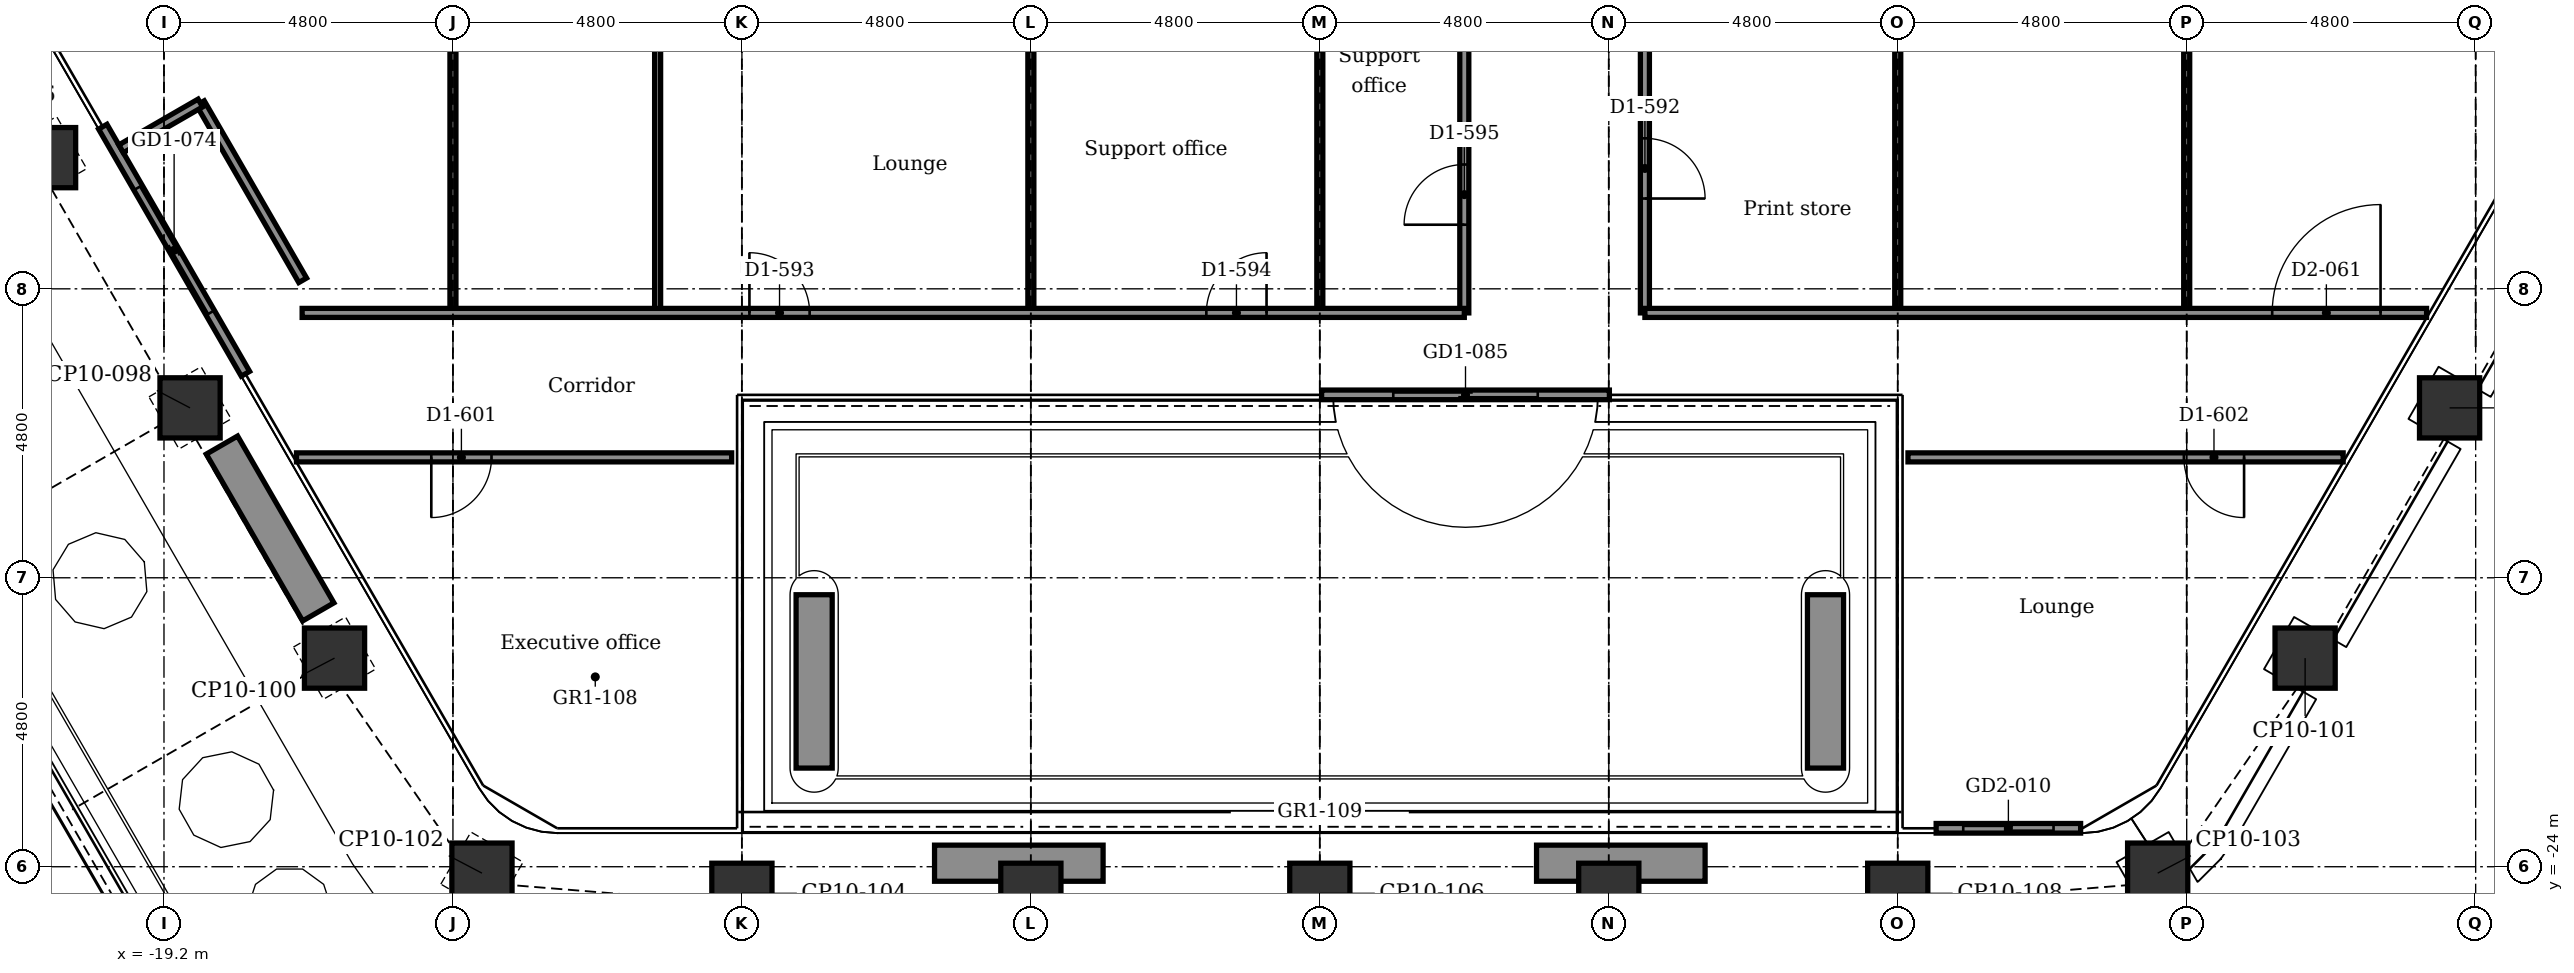
"""IFC4 building model, lengths in metres.
Left out: names, types, materials, properties, quantities, classifications, styles, units other than length and angle.
Written with IfcOpenShell. Run it as: python <this file> out.ifc"""

import sys

from ifc_helpers import new_model, si_unit, direction, frame, frame_2d, origin, origin_2d, place, context, subcontext, project, spatial, rectangle, extrude, element, fill, save


model = new_model("IFC4")
c1 = context("Model", 3, precision=1e-05, world=origin(), true_north=direction((0.0, 1.0)))
c2 = subcontext(c1, "Body", "Model", "MODEL_VIEW")
j1 = project(units=[si_unit("LENGTHUNIT", "METRE"), si_unit("PLANEANGLEUNIT", "RADIAN")], contexts=[c1])
p1 = place(None, origin())
s1 = spatial("IfcSite", under=j1, at=p1, CompositionType="ELEMENT")
p2 = place(p1, origin())
s2 = spatial("IfcBuilding", under=s1, at=p2, CompositionType="ELEMENT")
p3 = place(p2, frame((0.0, 0.0, 212.9)))
s3 = spatial("IfcBuildingStorey", under=s2, at=p3, CompositionType="ELEMENT", Elevation=212.9)
for number, where, z_axis, x_axis in (
    (1, (18.767, -16.378, -0.15), (0.0, 0.0, 1.0), (0.5, 0.866, 0.0)),
    (2, (16.367, -20.535, -0.15), (0.0, 0.0, 1.0), (0.5, 0.866, 0.0)),
    (3, (13.918, -24.107, -0.15), (0.0, 0.0, 1.0), (0.866, 0.5, 0.0)),
    (4, (9.6, -24.442, -0.15), (0.0, 0.0, 1.0), (1.0, 0.0, 0.0)),
    (5, (4.8, -24.442, -0.15), (0.0, 0.0, 1.0), (1.0, 0.0, 0.0)),
    (6, (0.0, -24.442, -0.15), (0.0, 0.0, 1.0), (1.0, 0.0, 0.0)),
    (7, (-4.8, -24.442, -0.15), (0.0, 0.0, 1.0), (1.0, 0.0, 0.0)),
    (8, (-9.6, -24.442, -0.15), (0.0, 0.0, 1.0), (1.0, 0.0, 0.0)),
    (9, (-13.918, -24.107, -0.15), (0.0, 0.0, 1.0), (0.5, 0.866, 0.0)),
    (10, (-16.367, -20.535, -0.15), (0.0, 0.0, 1.0), (0.866, 0.5, 0.0)),
    (11, (-18.767, -16.378, -0.15), (0.0, 0.0, 1.0), (0.866, 0.5, 0.0)),
    (12, (-21.167, -12.221, -0.15), (0.0, 0.0, 1.0), (0.866, 0.5, 0.0)),
):
    element("IfcColumn", number, at=place(p3, frame(where, z_axis=z_axis, x_axis=x_axis)), inside=s3, PredefinedType="COLUMN", context=c2, shape_type="SweptSolid", body=[
        extrude(rectangle(XDim=1.0, YDim=1.0, at=origin_2d()), origin(), (0.0, 0.0, 1.0), 3.75),
    ])
p4 = place(p3, frame((12.638, -23.362, 0.0), z_axis=(0.0, 0.0, 1.0), x_axis=(-1.0, 0.0, 0.0)))
e13 = element("IfcWall", 13, at=p4, inside=s3, PredefinedType="PARTITIONING", context=c2, shape_type="SweptSolid", body=[
    extrude(rectangle(XDim=2.4, YDim=0.16, at=frame_2d((1.2, 0.0))), origin(), (0.0, 0.0, 1.0), 3.6),
])
p5 = place(p4, frame((0.45, 0.0, 0.0)))
e14 = element("IfcOpeningElement", 14, at=p5, cuts=e13, PredefinedType="OPENING", context=c2, shape_type="SweptSolid", body=[
    extrude(rectangle(XDim=1.5, YDim=2.4, at=frame_2d((0.75, 1.2))), frame((0.0, 0.09, 0.0), z_axis=(0.0, -1.0, 0.0), x_axis=(1.0, 0.0, 0.0)), (0.0, 0.0, 1.0), 0.18),
])
p6 = place(p3, frame((4.81, -16.162, 0.0), z_axis=(0.0, 0.0, 1.0), x_axis=(-1.0, 0.0, 0.0)))
e15 = element("IfcWall", 15, at=p6, inside=s3, PredefinedType="PARTITIONING", context=c2, shape_type="SweptSolid", body=[
    extrude(rectangle(XDim=4.78, YDim=0.16, at=frame_2d((2.39, 0.0))), origin(), (0.0, 0.0, 1.0), 3.6),
])
p7 = place(p6, frame((1.19, 0.0, 0.0)))
e16 = element("IfcOpeningElement", 16, at=p7, cuts=e15, PredefinedType="OPENING", context=c2, shape_type="SweptSolid", body=[
    extrude(rectangle(XDim=2.4, YDim=2.4, at=frame_2d((1.2, 1.2))), frame((0.0, 0.09, 0.0), z_axis=(0.0, -1.0, 0.0), x_axis=(1.0, 0.0, 0.0)), (0.0, 0.0, 1.0), 0.18),
])
p8 = place(p3, frame((-17.847, -15.812, 0.0), z_axis=(0.0, 0.0, 1.0), x_axis=(-0.5000167099, 0.866015756104, 0.0)))
e17 = element("IfcWall", 17, at=p8, inside=s3, PredefinedType="PARTITIONING", context=c2, shape_type="SweptSolid", body=[
    extrude(rectangle(XDim=4.74, YDim=0.16, at=frame_2d((2.37, 0.0))), origin(), (0.0, 0.0, 1.0), 3.6),
])
p9 = place(p8, frame((1.17, 0.0, 0.0)))
e18 = element("IfcOpeningElement", 18, at=p9, cuts=e17, PredefinedType="OPENING", context=c2, shape_type="SweptSolid", body=[
    extrude(rectangle(XDim=2.4, YDim=2.4, at=frame_2d((1.2, 1.2))), frame((0.0, 0.09, 0.0), z_axis=(0.0, -1.0, 0.0), x_axis=(1.0, 0.0, 0.0)), (0.0, 0.0, 1.0), 0.18),
])
p10 = place(p3, frame((-16.637, -19.767, 0.0), z_axis=(0.0, 0.0, 1.0), x_axis=(-0.500028443584, 0.866008981251, 0.0)))
e19 = element("IfcWall", 19, at=p10, inside=s3, PredefinedType="USERDEFINED", context=c2, shape_type="SweptSolid", body=[
    extrude(rectangle(XDim=3.2, YDim=0.6, at=frame_2d((1.6, 0.0))), origin(), (0.0, 0.0, 1.0), 0.7),
])
for number, where, z_axis, x_axis in (
    (20, (8.4, -19.481, 0.0), (0.0, 0.0, 1.0), (0.0, -1.0, 0.0)),
    (21, (-8.4, -19.481, 0.0), (0.0, 0.0, 1.0), (0.0, -1.0, 0.0)),
):
    element("IfcWall", number, at=place(p3, frame(where, z_axis=z_axis, x_axis=x_axis)), inside=s3, PredefinedType="USERDEFINED", context=c2, shape_type="SweptSolid", body=[
        extrude(rectangle(XDim=2.88, YDim=0.6, at=frame_2d((1.44, 0.0))), origin(), (0.0, 0.0, 1.0), 0.7),
    ])
for number, where, z_axis, x_axis in (
    (22, (3.6, -23.942, 0.0), (0.0, 0.0, 1.0), (1.0, 0.0, 0.0)),
    (23, (-3.6, -23.942, 0.0), (0.0, 0.0, 1.0), (-1.0, 0.0, 0.0)),
):
    element("IfcWall", number, at=place(p3, frame(where, z_axis=z_axis, x_axis=x_axis)), inside=s3, PredefinedType="USERDEFINED", context=c2, shape_type="SweptSolid", body=[
        extrude(rectangle(XDim=2.8, YDim=0.6, at=frame_2d((1.4, 0.0))), origin(), (0.0, 0.0, 1.0), 0.7),
    ])
p11 = place(p3, frame((14.4, -14.8, 0.0), z_axis=(0.0, 0.0, 1.0), x_axis=(0.0, 1.0, 0.0)))
e24 = element("IfcWall", 24, at=p11, inside=s3, PredefinedType="PARTITIONING", context=c2, shape_type="SweptSolid", body=[
    extrude(rectangle(XDim=5.094, YDim=0.1, at=frame_2d((2.547, 0.0))), origin(), (0.0, 0.0, 1.0), 2.916),
])
p12 = place(p3, frame((9.6, -14.8, 0.0), z_axis=(0.0, 0.0, 1.0), x_axis=(0.0, 1.0, 0.0)))
e25 = element("IfcWall", 25, at=p12, inside=s3, PredefinedType="PARTITIONING", context=c2, shape_type="SweptSolid", body=[
    extrude(rectangle(XDim=4.65, YDim=0.1, at=frame_2d((2.325, 0.0))), origin(), (0.0, 0.0, 1.0), 2.838),
])
p13 = place(p3, frame((5.4, -14.8, 0.0), z_axis=(0.0, 0.0, 1.0), x_axis=(0.0, 1.0, 0.0)))
e26 = element("IfcWall", 26, at=p13, inside=s3, PredefinedType="PARTITIONING", context=c2, shape_type="SweptSolid", body=[
    extrude(rectangle(XDim=4.65, YDim=0.15, at=frame_2d((2.325, 0.0))), origin(), (0.0, 0.0, 1.0), 3.6),
])
p14 = place(p13, frame((1.9, 0.0, 0.0)))
e27 = element("IfcOpeningElement", 27, at=p14, cuts=e26, PredefinedType="OPENING", context=c2, shape_type="SweptSolid", body=[
    extrude(rectangle(XDim=1.0, YDim=2.1, at=frame_2d((0.5, 1.05))), frame((0.0, 0.085, 0.0), z_axis=(0.0, -1.0, 0.0), x_axis=(1.0, 0.0, 0.0)), (0.0, 0.0, 1.0), 0.17),
])
p15 = place(p3, frame((2.4, -14.8, 0.0), z_axis=(0.0, 0.0, 1.0), x_axis=(0.0, 1.0, 0.0)))
e28 = element("IfcWall", 28, at=p15, inside=s3, PredefinedType="PARTITIONING", context=c2, shape_type="SweptSolid", body=[
    extrude(rectangle(XDim=4.85, YDim=0.15, at=frame_2d((2.425, 0.0))), origin(), (0.0, 0.0, 1.0), 3.6),
])
p16 = place(p15, frame((1.465, 0.0, 0.0)))
e29 = element("IfcOpeningElement", 29, at=p16, cuts=e28, PredefinedType="OPENING", context=c2, shape_type="SweptSolid", body=[
    extrude(rectangle(XDim=1.0, YDim=2.1, at=frame_2d((0.5, 1.05))), frame((0.0, 0.085, 0.0), z_axis=(0.0, -1.0, 0.0), x_axis=(1.0, 0.0, 0.0)), (0.0, 0.0, 1.0), 0.17),
])
for number, where, z_axis, x_axis in (
    (30, (0.0, -14.8, 0.0), (0.0, 0.0, 1.0), (0.0, 1.0, 0.0)),
    (31, (-4.8, -14.8, 0.0), (0.0, 0.0, 1.0), (0.0, 1.0, 0.0)),
):
    element("IfcWall", number, at=place(p3, frame(where, z_axis=z_axis, x_axis=x_axis)), inside=s3, PredefinedType="PARTITIONING", context=c2, shape_type="SweptSolid", body=[
        extrude(rectangle(XDim=4.85, YDim=0.1, at=frame_2d((2.425, 0.0))), origin(), (0.0, 0.0, 1.0), 2.838),
    ])
p17 = place(p3, frame((-11.0, -14.8, 0.0), z_axis=(0.0, 0.0, 1.0), x_axis=(0.0, 1.0, 0.0)))
e32 = element("IfcWall", 32, at=p17, inside=s3, PredefinedType="PARTITIONING", context=c2, shape_type="SweptSolid", body=[
    extrude(rectangle(XDim=4.8, YDim=0.1, at=frame_2d((2.4, 0.0))), origin(), (0.0, 0.0, 1.0), 3.6),
])
p18 = place(p3, frame((-14.4, -14.8, 0.0), z_axis=(0.0, 0.0, 1.0), x_axis=(0.0, 1.0, 0.0)))
e33 = element("IfcWall", 33, at=p18, inside=s3, PredefinedType="PARTITIONING", context=c2, shape_type="SweptSolid", body=[
    extrude(rectangle(XDim=5.094, YDim=0.1, at=frame_2d((2.547, 0.0))), origin(), (0.0, 0.0, 1.0), 2.916),
])
p19 = place(p3, frame((-18.596, -11.314, 0.0), z_axis=(0.0, 0.0, 1.0), x_axis=(0.499977295307, -0.866038511948, 0.0)))
e34 = element("IfcWall", 34, at=p19, inside=s3, PredefinedType="PARTITIONING", context=c2, shape_type="SweptSolid", body=[
    extrude(rectangle(XDim=3.4, YDim=0.15, at=frame_2d((1.7, 0.0))), origin(), (0.0, 0.0, 1.0), 3.6),
])
p20 = place(p3, frame((-19.912, -12.074, 0.0), z_axis=(0.0, 0.0, 1.0), x_axis=(0.866030456496, 0.499991248344, 0.0)))
e35 = element("IfcWall", 35, at=p20, inside=s3, PredefinedType="PARTITIONING", context=c2, shape_type="SweptSolid", body=[
    extrude(rectangle(XDim=1.52, YDim=0.15, at=frame_2d((0.76, 0.0))), origin(), (0.0, 0.0, 1.0), 3.6),
])
p21 = place(p3, frame((-16.999, -17.2, 0.0), z_axis=(0.0, 0.0, 1.0), x_axis=(1.0, 0.0, 0.0)))
e36 = element("IfcWall", 36, at=p21, inside=s3, PredefinedType="PARTITIONING", context=c2, shape_type="SweptSolid", body=[
    extrude(rectangle(XDim=7.229, YDim=0.15, at=frame_2d((3.615, 0.0))), origin(), (0.0, 0.0, 1.0), 3.6),
])
p22 = place(p21, frame((2.24, 0.0, 0.0)))
e37 = element("IfcOpeningElement", 37, at=p22, cuts=e36, PredefinedType="OPENING", context=c2, shape_type="SweptSolid", body=[
    extrude(rectangle(XDim=1.0, YDim=2.1, at=frame_2d((0.5, 1.05))), frame((0.0, 0.085, 0.0), z_axis=(0.0, -1.0, 0.0), x_axis=(1.0, 0.0, 0.0)), (0.0, 0.0, 1.0), 0.17),
])
p23 = place(p3, frame((9.77, -17.2, 0.0), z_axis=(0.0, 0.0, 1.0), x_axis=(1.0, 0.0, 0.0)))
e38 = element("IfcWall", 38, at=p23, inside=s3, PredefinedType="PARTITIONING", context=c2, shape_type="SweptSolid", body=[
    extrude(rectangle(XDim=7.229, YDim=0.15, at=frame_2d((3.615, 0.0))), origin(), (0.0, 0.0, 1.0), 3.6),
])
p24 = place(p23, frame((4.583, 0.0, 0.0)))
e39 = element("IfcOpeningElement", 39, at=p24, cuts=e38, PredefinedType="OPENING", context=c2, shape_type="SweptSolid", body=[
    extrude(rectangle(XDim=1.0, YDim=2.1, at=frame_2d((0.5, 1.05))), frame((0.0, 0.085, 0.0), z_axis=(0.0, -1.0, 0.0), x_axis=(1.0, 0.0, 0.0)), (0.0, 0.0, 1.0), 0.17),
])
p25 = place(p3, frame((-16.905, -14.8, 0.0), z_axis=(0.0, 0.0, 1.0), x_axis=(1.0, 0.0, 0.0)))
e40 = element("IfcWall", 40, at=p25, inside=s3, PredefinedType="PARTITIONING", context=c2, shape_type="SweptSolid", body=[
    extrude(rectangle(XDim=19.305, YDim=0.15, at=frame_2d((9.653, 0.0))), origin(), (0.0, 0.0, 1.0), 3.6),
])
p26 = place(p25, frame((7.43, 0.0, 0.0)))
e41 = element("IfcOpeningElement", 41, at=p26, cuts=e40, PredefinedType="OPENING", context=c2, shape_type="SweptSolid", body=[
    extrude(rectangle(XDim=1.0, YDim=2.1, at=frame_2d((0.5, 1.05))), frame((0.0, 0.085, 0.0), z_axis=(0.0, -1.0, 0.0), x_axis=(1.0, 0.0, 0.0)), (0.0, 0.0, 1.0), 0.17),
])
p27 = place(p25, frame((15.02, 0.0, 0.0)))
e42 = element("IfcOpeningElement", 42, at=p27, cuts=e40, PredefinedType="OPENING", context=c2, shape_type="SweptSolid", body=[
    extrude(rectangle(XDim=1.0, YDim=2.1, at=frame_2d((0.5, 1.05))), frame((0.0, 0.085, 0.0), z_axis=(0.0, -1.0, 0.0), x_axis=(1.0, 0.0, 0.0)), (0.0, 0.0, 1.0), 0.17),
])
p28 = place(p3, frame((5.4, -14.8, 0.0), z_axis=(0.0, 0.0, 1.0), x_axis=(1.0, 0.0, 0.0)))
e43 = element("IfcWall", 43, at=p28, inside=s3, PredefinedType="PARTITIONING", context=c2, shape_type="SweptSolid", body=[
    extrude(rectangle(XDim=12.985, YDim=0.15, at=frame_2d((6.492, 0.0))), origin(), (0.0, 0.0, 1.0), 3.6),
])
p29 = place(p28, frame((10.42, 0.0, 0.0)))
e44 = element("IfcOpeningElement", 44, at=p29, cuts=e43, PredefinedType="OPENING", context=c2, shape_type="SweptSolid", body=[
    extrude(rectangle(XDim=1.8, YDim=2.1, at=frame_2d((0.9, 1.05))), frame((0.0, 0.085, 0.0), z_axis=(0.0, -1.0, 0.0), x_axis=(1.0, 0.0, 0.0)), (0.0, 0.0, 1.0), 0.17),
])
p30 = place(p5, origin())
e45 = element("IfcDoor", 45, at=p30, inside=s3, OperationType="DOUBLE_DOOR_SLIDING", PredefinedType="DOOR", context=c2, shape_type="SweptSolid", body=[
    extrude(rectangle(XDim=1.5, YDim=2.4, at=frame_2d((0.75, 1.2))), frame((0.0, 0.025, 0.0), z_axis=(0.0, -1.0, 0.0), x_axis=(1.0, 0.0, 0.0)), (0.0, 0.0, 1.0), 0.05),
])
fill(e14, e45)
p31 = place(p7, origin())
e46 = element("IfcDoor", 46, at=p31, inside=s3, OperationType="DOUBLE_DOOR_SLIDING", PredefinedType="DOOR", context=c2, shape_type="SweptSolid", body=[
    extrude(rectangle(XDim=2.4, YDim=2.4, at=frame_2d((1.2, 1.2))), frame((0.0, 0.025, 0.0), z_axis=(0.0, -1.0, 0.0), x_axis=(1.0, 0.0, 0.0)), (0.0, 0.0, 1.0), 0.05),
])
fill(e16, e46)
p32 = place(p9, origin())
e47 = element("IfcDoor", 47, at=p32, inside=s3, OperationType="DOUBLE_DOOR_SLIDING", PredefinedType="DOOR", context=c2, shape_type="SweptSolid", body=[
    extrude(rectangle(XDim=2.4, YDim=2.4, at=frame_2d((1.2, 1.2))), frame((0.0, 0.025, 0.0), z_axis=(0.0, -1.0, 0.0), x_axis=(1.0, 0.0, 0.0)), (0.0, 0.0, 1.0), 0.05),
])
fill(e18, e47)
p33 = place(p14, frame((1.0, 0.0, 0.0), z_axis=(0.0, 0.0, 1.0), x_axis=(-1.0, 0.0, 0.0)))
e48 = element("IfcDoor", 48, at=p33, inside=s3, OperationType="SINGLE_SWING_LEFT", PredefinedType="DOOR", context=c2, shape_type="SweptSolid", body=[
    extrude(rectangle(XDim=1.0, YDim=2.1, at=frame_2d((0.5, 1.05))), frame((0.0, 0.025, 0.0), z_axis=(0.0, -1.0, 0.0), x_axis=(1.0, 0.0, 0.0)), (0.0, 0.0, 1.0), 0.05),
])
fill(e27, e48)
p34 = place(p26, origin())
e49 = element("IfcDoor", 49, at=p34, inside=s3, OperationType="SINGLE_SWING_LEFT", PredefinedType="DOOR", context=c2, shape_type="SweptSolid", body=[
    extrude(rectangle(XDim=1.0, YDim=2.1, at=frame_2d((0.5, 1.05))), frame((0.0, 0.025, 0.0), z_axis=(0.0, -1.0, 0.0), x_axis=(1.0, 0.0, 0.0)), (0.0, 0.0, 1.0), 0.05),
])
fill(e41, e49)
p35 = place(p27, origin())
e50 = element("IfcDoor", 50, at=p35, inside=s3, OperationType="SINGLE_SWING_RIGHT", PredefinedType="DOOR", context=c2, shape_type="SweptSolid", body=[
    extrude(rectangle(XDim=1.0, YDim=2.1, at=frame_2d((0.5, 1.05))), frame((0.0, 0.025, 0.0), z_axis=(0.0, -1.0, 0.0), x_axis=(1.0, 0.0, 0.0)), (0.0, 0.0, 1.0), 0.05),
])
fill(e42, e50)
p36 = place(p16, origin())
e51 = element("IfcDoor", 51, at=p36, inside=s3, OperationType="SINGLE_SWING_LEFT", PredefinedType="DOOR", context=c2, shape_type="SweptSolid", body=[
    extrude(rectangle(XDim=1.0, YDim=2.1, at=frame_2d((0.5, 1.05))), frame((0.0, 0.025, 0.0), z_axis=(0.0, -1.0, 0.0), x_axis=(1.0, 0.0, 0.0)), (0.0, 0.0, 1.0), 0.05),
])
fill(e29, e51)
p37 = place(p22, frame((1.0, 0.0, 0.0), z_axis=(0.0, 0.0, 1.0), x_axis=(-1.0, 0.0, 0.0)))
e52 = element("IfcDoor", 52, at=p37, inside=s3, OperationType="SINGLE_SWING_LEFT", PredefinedType="DOOR", context=c2, shape_type="SweptSolid", body=[
    extrude(rectangle(XDim=1.0, YDim=2.1, at=frame_2d((0.5, 1.05))), frame((0.0, 0.025, 0.0), z_axis=(0.0, -1.0, 0.0), x_axis=(1.0, 0.0, 0.0)), (0.0, 0.0, 1.0), 0.05),
])
fill(e37, e52)
p38 = place(p24, frame((1.0, 0.0, 0.0), z_axis=(0.0, 0.0, 1.0), x_axis=(-1.0, 0.0, 0.0)))
e53 = element("IfcDoor", 53, at=p38, inside=s3, OperationType="SINGLE_SWING_RIGHT", PredefinedType="DOOR", context=c2, shape_type="SweptSolid", body=[
    extrude(rectangle(XDim=1.0, YDim=2.1, at=frame_2d((0.5, 1.05))), frame((0.0, 0.025, 0.0), z_axis=(0.0, -1.0, 0.0), x_axis=(1.0, 0.0, 0.0)), (0.0, 0.0, 1.0), 0.05),
])
fill(e39, e53)
p39 = place(p29, origin())
e54 = element("IfcDoor", 54, at=p39, inside=s3, OperationType="SINGLE_SWING_RIGHT", PredefinedType="DOOR", context=c2, shape_type="SweptSolid", body=[
    extrude(rectangle(XDim=1.8, YDim=2.1, at=frame_2d((0.9, 1.05))), frame((0.0, 0.025, 0.0), z_axis=(0.0, -1.0, 0.0), x_axis=(1.0, 0.0, 0.0)), (0.0, 0.0, 1.0), 0.05),
])
fill(e44, e54)
save(model, sys.argv[1])
